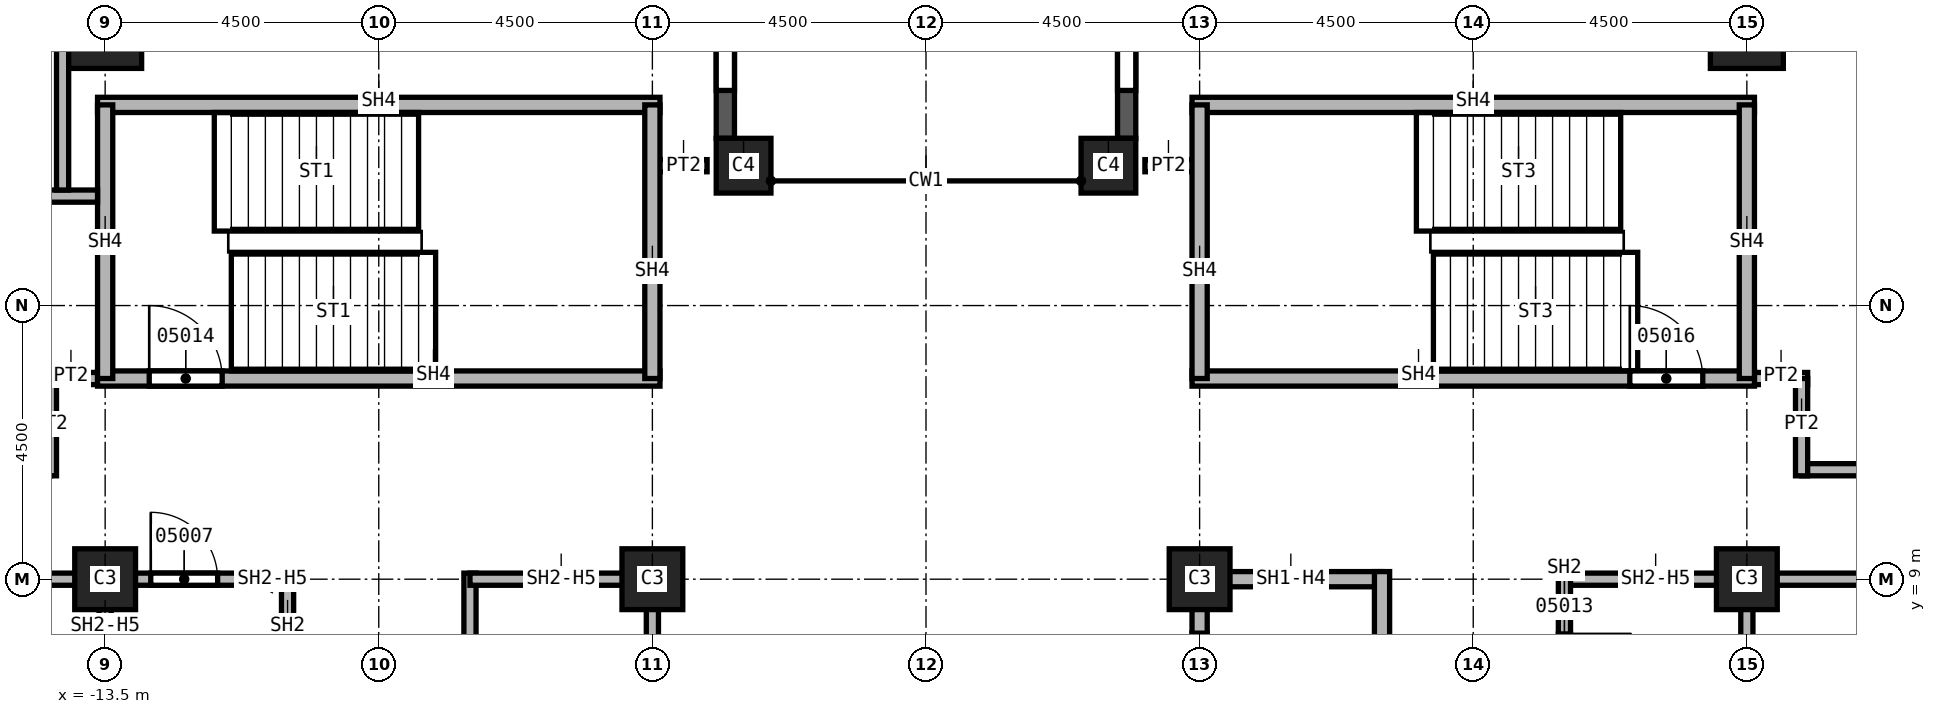
"""IFC4 building model, lengths in metres.
Left out: names, types, materials, properties, quantities, classifications, styles, units other than length and angle.
Written with IfcOpenShell. Run it as: python <this file> out.ifc"""

import sys

from ifc_helpers import new_model, si_unit, direction, frame, frame_2d, origin, origin_2d, place, context, subcontext, project, spatial, rectangle, extrude, element, fill, save


model = new_model("IFC4")
c1 = context("Model", 3, precision=1e-05, world=origin(), true_north=direction((0.0, 1.0)))
c2 = subcontext(c1, "Body", "Model", "MODEL_VIEW")
j1 = project(units=[si_unit("LENGTHUNIT", "METRE"), si_unit("PLANEANGLEUNIT", "RADIAN")], contexts=[c1])
p1 = place(None, origin())
s1 = spatial("IfcSite", under=j1, at=p1, CompositionType="ELEMENT")
p2 = place(p1, origin())
s2 = spatial("IfcBuilding", under=s1, at=p2, CompositionType="ELEMENT")
p3 = place(p2, frame((0.0, 0.0, 116.0)))
s3 = spatial("IfcBuildingStorey", under=s2, at=p3, CompositionType="ELEMENT", Elevation=116.0)
for number, where, z_axis, x_axis in (
    (1, (13.5, 18.0, 0.0), (0.0, 0.0, 1.0), (1.0, 0.0, 0.0)),
    (2, (-13.5, 18.0, 0.0), (0.0, 0.0, 1.0), (1.0, 0.0, 0.0)),
):
    element("IfcColumn", number, at=place(p3, frame(where, z_axis=z_axis, x_axis=x_axis)), inside=s3, PredefinedType="COLUMN", context=c2, shape_type="SweptSolid", body=[
        extrude(rectangle(XDim=1.2, YDim=1.2, at=origin_2d()), origin(), (0.0, 0.0, 1.0), 3.6),
    ])
for number, where, z_axis, x_axis in (
    (3, (4.5, 9.0, 0.0), (0.0, 0.0, 1.0), (1.0, 0.0, 0.0)),
    (4, (13.5, 9.0, 0.0), (0.0, 0.0, 1.0), (1.0, 0.0, 0.0)),
    (5, (-4.5, 9.0, 0.0), (0.0, 0.0, 1.0), (1.0, 0.0, 0.0)),
    (6, (-13.5, 9.0, 0.0), (0.0, 0.0, 1.0), (1.0, 0.0, 0.0)),
):
    element("IfcColumn", number, at=place(p3, frame(where, z_axis=z_axis, x_axis=x_axis)), inside=s3, PredefinedType="COLUMN", context=c2, shape_type="SweptSolid", body=[
        extrude(rectangle(XDim=1.0, YDim=1.0, at=origin_2d()), origin(), (0.0, 0.0, 1.0), 3.6),
    ])
for number, where, z_axis, x_axis in (
    (7, (3.0, 15.8, 0.0), (0.0, 0.0, 1.0), (1.0, 0.0, 0.0)),
    (8, (-3.0, 15.8, 0.0), (0.0, 0.0, 1.0), (1.0, 0.0, 0.0)),
):
    element("IfcColumn", number, at=place(p3, frame(where, z_axis=z_axis, x_axis=x_axis)), inside=s3, PredefinedType="COLUMN", context=c2, shape_type="SweptSolid", body=[
        extrude(rectangle(XDim=0.9, YDim=0.9, at=origin_2d()), origin(), (0.0, 0.0, 1.0), 3.6),
    ])
p4 = place(p3, frame((3.3, 24.2, 0.0), z_axis=(0.0, 0.0, 1.0), x_axis=(0.0, -1.0, 0.0)))
e9 = element("IfcWall", 9, at=p4, inside=s3, PredefinedType="SOLIDWALL", context=c2, shape_type="SweptSolid", body=[
    extrude(rectangle(XDim=7.95, YDim=0.3, at=frame_2d((3.975, 0.0))), origin(), (0.0, 0.0, 1.0), 3.0),
])
p5 = place(p4, frame((0.788, 0.0, 0.8)))
e10 = element("IfcOpeningElement", 10, at=p5, cuts=e9, PredefinedType="OPENING", context=c2, shape_type="SweptSolid", body=[
    extrude(rectangle(XDim=2.4, YDim=1.95, at=frame_2d((1.2, 0.975))), frame((0.0, 0.15, 0.0), z_axis=(0.0, -1.0, 0.0), x_axis=(1.0, 0.0, 0.0)), (0.0, 0.0, 1.0), 0.3),
])
p6 = place(p4, frame((4.762, 0.0, 0.8)))
e11 = element("IfcOpeningElement", 11, at=p6, cuts=e9, PredefinedType="OPENING", context=c2, shape_type="SweptSolid", body=[
    extrude(rectangle(XDim=2.4, YDim=1.95, at=frame_2d((1.2, 0.975))), frame((0.0, 0.15, 0.0), z_axis=(0.0, -1.0, 0.0), x_axis=(1.0, 0.0, 0.0)), (0.0, 0.0, 1.0), 0.3),
])
p7 = place(p3, frame((-3.3, 16.25, 0.0), z_axis=(0.0, 0.0, 1.0), x_axis=(0.0, 1.0, 0.0)))
e12 = element("IfcWall", 12, at=p7, inside=s3, PredefinedType="SOLIDWALL", context=c2, shape_type="SweptSolid", body=[
    extrude(rectangle(XDim=7.95, YDim=0.3, at=frame_2d((3.975, 0.0))), origin(), (0.0, 0.0, 1.0), 3.0),
])
p8 = place(p7, frame((0.788, 0.0, 0.8)))
e13 = element("IfcOpeningElement", 13, at=p8, cuts=e12, PredefinedType="OPENING", context=c2, shape_type="SweptSolid", body=[
    extrude(rectangle(XDim=2.4, YDim=1.95, at=frame_2d((1.2, 0.975))), frame((0.0, 0.15, 0.0), z_axis=(0.0, -1.0, 0.0), x_axis=(1.0, 0.0, 0.0)), (0.0, 0.0, 1.0), 0.3),
])
p9 = place(p7, frame((4.762, 0.0, 0.8)))
e14 = element("IfcOpeningElement", 14, at=p9, cuts=e12, PredefinedType="OPENING", context=c2, shape_type="SweptSolid", body=[
    extrude(rectangle(XDim=2.4, YDim=1.95, at=frame_2d((1.2, 0.975))), frame((0.0, 0.15, 0.0), z_axis=(0.0, -1.0, 0.0), x_axis=(1.0, 0.0, 0.0)), (0.0, 0.0, 1.0), 0.3),
])
p10 = place(p3, frame((-14.5, 12.3, 0.0), z_axis=(0.0, 0.0, 1.0), x_axis=(1.0, 0.0, 0.0)))
e15 = element("IfcWall", 15, at=p10, inside=s3, PredefinedType="PARTITIONING", context=c2, shape_type="SweptSolid", body=[
    extrude(rectangle(XDim=1.125, YDim=0.2, at=frame_2d((0.562, 0.0))), origin(), (0.0, 0.0, 1.0), 3.6),
])
p11 = place(p3, frame((-13.5, 9.0, 0.0), z_axis=(0.0, 0.0, 1.0), x_axis=(-1.0, 0.0, 0.0)))
e16 = element("IfcWall", 16, at=p11, inside=s3, PredefinedType="PARTITIONING", context=c2, shape_type="SweptSolid", body=[
    extrude(rectangle(XDim=4.5, YDim=0.2, at=frame_2d((2.25, 0.0))), origin(), (0.0, 0.0, 1.0), 3.6),
])
p12 = place(p3, frame((-14.4, 10.7, 0.0), z_axis=(0.0, 0.0, 1.0), x_axis=(0.0, 1.0, 0.0)))
e17 = element("IfcWall", 17, at=p12, inside=s3, PredefinedType="PARTITIONING", context=c2, shape_type="SweptSolid", body=[
    extrude(rectangle(XDim=1.6, YDim=0.2, at=frame_2d((0.8, 0.0))), origin(), (0.0, 0.0, 1.0), 3.6),
])
for number, where, z_axis, x_axis in (
    (18, (-4.5, 15.8, 0.0), (0.0, 0.0, 1.0), (1.0, 0.0, 0.0)),
    (19, (3.6, 15.8, 0.0), (0.0, 0.0, 1.0), (1.0, 0.0, 0.0)),
):
    element("IfcWall", number, at=place(p3, frame(where, z_axis=z_axis, x_axis=x_axis)), inside=s3, PredefinedType="PARTITIONING", context=c2, shape_type="SweptSolid", body=[
        extrude(rectangle(XDim=0.9, YDim=0.2, at=frame_2d((0.45, 0.0))), origin(), (0.0, 0.0, 1.0), 3.6),
    ])
p13 = place(p3, frame((13.375, 12.3, 0.0), z_axis=(0.0, 0.0, 1.0), x_axis=(1.0, 0.0, 0.0)))
e20 = element("IfcWall", 20, at=p13, inside=s3, PredefinedType="PARTITIONING", context=c2, shape_type="SweptSolid", body=[
    extrude(rectangle(XDim=1.125, YDim=0.2, at=frame_2d((0.562, 0.0))), origin(), (0.0, 0.0, 1.0), 3.6),
])
p14 = place(p3, frame((18.0, 9.0, 0.0), z_axis=(0.0, 0.0, 1.0), x_axis=(-1.0, 0.0, 0.0)))
e21 = element("IfcWall", 21, at=p14, inside=s3, PredefinedType="PARTITIONING", context=c2, shape_type="SweptSolid", body=[
    extrude(rectangle(XDim=4.5, YDim=0.2, at=frame_2d((2.25, 0.0))), origin(), (0.0, 0.0, 1.0), 3.6),
])
p15 = place(p3, frame((14.4, 10.8, 0.0), z_axis=(0.0, 0.0, 1.0), x_axis=(1.0, 0.0, 0.0)))
e22 = element("IfcWall", 22, at=p15, inside=s3, PredefinedType="PARTITIONING", context=c2, shape_type="SweptSolid", body=[
    extrude(rectangle(XDim=3.6, YDim=0.2, at=frame_2d((1.8, 0.0))), origin(), (0.0, 0.0, 1.0), 3.6),
])
p16 = place(p3, frame((14.4, 12.3, 0.0), z_axis=(0.0, 0.0, 1.0), x_axis=(0.0, -1.0, 0.0)))
e23 = element("IfcWall", 23, at=p16, inside=s3, PredefinedType="PARTITIONING", context=c2, shape_type="SweptSolid", body=[
    extrude(rectangle(XDim=1.6, YDim=0.2, at=frame_2d((0.8, 0.0))), origin(), (0.0, 0.0, 1.0), 3.6),
])
p17 = place(p3, frame((-13.6, 9.0, 0.0), z_axis=(0.0, 0.0, 1.0), x_axis=(1.0, 0.0, 0.0)))
e24 = element("IfcWall", 24, at=p17, inside=s3, PredefinedType="SOLIDWALL", context=c2, shape_type="SweptSolid", body=[
    extrude(rectangle(XDim=3.1, YDim=0.2, at=frame_2d((1.55, 0.0))), origin(), (0.0, 0.0, 1.0), 2.838),
])
p18 = place(p17, frame((0.85, 0.0, 0.0)))
e25 = element("IfcOpeningElement", 25, at=p18, cuts=e24, PredefinedType="OPENING", context=c2, shape_type="SweptSolid", body=[
    extrude(rectangle(XDim=1.1, YDim=2.1, at=frame_2d((0.55, 1.05))), frame((0.0, 0.1, 0.0), z_axis=(0.0, -1.0, 0.0), x_axis=(1.0, 0.0, 0.0)), (0.0, 0.0, 1.0), 0.2),
])
p19 = place(p3, frame((-13.5, 7.5, 0.0), z_axis=(0.0, 0.0, 1.0), x_axis=(0.0, 1.0, 0.0)))
e26 = element("IfcWall", 26, at=p19, inside=s3, PredefinedType="SOLIDWALL", context=c2, shape_type="SweptSolid", body=[
    extrude(rectangle(XDim=1.6, YDim=0.2, at=frame_2d((0.8, 0.0))), origin(), (0.0, 0.0, 1.0), 2.838),
])
p20 = place(p3, frame((-10.5, 7.425, 0.0), z_axis=(0.0, 0.0, 1.0), x_axis=(0.0, 1.0, 0.0)))
e27 = element("IfcWall", 27, at=p20, inside=s3, PredefinedType="SOLIDWALL", context=c2, shape_type="SweptSolid", body=[
    extrude(rectangle(XDim=1.675, YDim=0.2, at=frame_2d((0.837, 0.0))), origin(), (0.0, 0.0, 1.0), 3.6),
])
p21 = place(p3, frame((-7.5, 2.875, 0.0), z_axis=(0.0, 0.0, 1.0), x_axis=(0.0, 1.0, 0.0)))
e28 = element("IfcWall", 28, at=p21, inside=s3, PredefinedType="SOLIDWALL", context=c2, shape_type="SweptSolid", body=[
    extrude(rectangle(XDim=6.225, YDim=0.2, at=frame_2d((3.113, 0.0))), origin(), (0.0, 0.0, 1.0), 3.6),
])
p22 = place(p3, frame((-7.5, 9.0, 0.0), z_axis=(0.0, 0.0, 1.0), x_axis=(1.0, 0.0, 0.0)))
e29 = element("IfcWall", 29, at=p22, inside=s3, PredefinedType="SOLIDWALL", context=c2, shape_type="SweptSolid", body=[
    extrude(rectangle(XDim=3.0, YDim=0.2, at=frame_2d((1.5, 0.0))), origin(), (0.0, 0.0, 1.0), 2.838),
])
p23 = place(p3, frame((-4.5, 9.1, 0.0), z_axis=(0.0, 0.0, 1.0), x_axis=(0.0, -1.0, 0.0)))
e30 = element("IfcWall", 30, at=p23, inside=s3, PredefinedType="SOLIDWALL", context=c2, shape_type="SweptSolid", body=[
    extrude(rectangle(XDim=9.1, YDim=0.2, at=frame_2d((4.55, 0.0))), origin(), (0.0, 0.0, 1.0), 2.838),
])
p24 = place(p23, frame((4.9, 0.0, 0.0)))
e31 = element("IfcOpeningElement", 31, at=p24, cuts=e30, PredefinedType="OPENING", context=c2, shape_type="SweptSolid", body=[
    extrude(rectangle(XDim=1.1, YDim=2.1, at=frame_2d((0.55, 1.05))), frame((0.0, 0.1, 0.0), z_axis=(0.0, -1.0, 0.0), x_axis=(1.0, 0.0, 0.0)), (0.0, 0.0, 1.0), 0.2),
])
p25 = place(p3, frame((10.5, 9.0, 0.0), z_axis=(0.0, 0.0, 1.0), x_axis=(1.0, 0.0, 0.0)))
e32 = element("IfcWall", 32, at=p25, inside=s3, PredefinedType="SOLIDWALL", context=c2, shape_type="SweptSolid", body=[
    extrude(rectangle(XDim=3.1, YDim=0.2, at=frame_2d((1.55, 0.0))), origin(), (0.0, 0.0, 1.0), 2.838),
])
p26 = place(p3, frame((10.5, 9.1, 0.0), z_axis=(0.0, 0.0, 1.0), x_axis=(0.0, -1.0, 0.0)))
e33 = element("IfcWall", 33, at=p26, inside=s3, PredefinedType="SOLIDWALL", context=c2, shape_type="SweptSolid", body=[
    extrude(rectangle(XDim=3.225, YDim=0.2, at=frame_2d((1.613, 0.0))), origin(), (0.0, 0.0, 1.0), 3.6),
])
p27 = place(p26, frame((1.0, 0.0, 0.0)))
e34 = element("IfcOpeningElement", 34, at=p27, cuts=e33, PredefinedType="OPENING", context=c2, shape_type="SweptSolid", body=[
    extrude(rectangle(XDim=1.1, YDim=2.1, at=frame_2d((0.55, 1.05))), frame((0.0, 0.1, 0.0), z_axis=(0.0, -1.0, 0.0), x_axis=(1.0, 0.0, 0.0)), (0.0, 0.0, 1.0), 0.2),
])
p28 = place(p3, frame((13.5, 9.1, 0.0), z_axis=(0.0, 0.0, 1.0), x_axis=(0.0, -1.0, 0.0)))
e35 = element("IfcWall", 35, at=p28, inside=s3, PredefinedType="SOLIDWALL", context=c2, shape_type="SweptSolid", body=[
    extrude(rectangle(XDim=3.1, YDim=0.2, at=frame_2d((1.55, 0.0))), origin(), (0.0, 0.0, 1.0), 2.838),
])
p29 = place(p3, frame((4.5, 0.0, 0.0), z_axis=(0.0, 0.0, 1.0), x_axis=(0.0, 1.0, 0.0)))
e36 = element("IfcWall", 36, at=p29, inside=s3, PredefinedType="SOLIDWALL", context=c2, shape_type="SweptSolid", body=[
    extrude(rectangle(XDim=9.125, YDim=0.25, at=frame_2d((4.562, 0.0))), origin(), (0.0, 0.0, 1.0), 2.838),
])
p30 = place(p29, frame((0.95, 0.0, 0.0)))
e37 = element("IfcOpeningElement", 37, at=p30, cuts=e36, PredefinedType="OPENING", context=c2, shape_type="SweptSolid", body=[
    extrude(rectangle(XDim=1.1, YDim=2.1, at=frame_2d((0.55, 1.05))), frame((0.0, 0.125, 0.0), z_axis=(0.0, -1.0, 0.0), x_axis=(1.0, 0.0, 0.0)), (0.0, 0.0, 1.0), 0.25),
])
p31 = place(p29, frame((3.95, 0.0, 0.0)))
e38 = element("IfcOpeningElement", 38, at=p31, cuts=e36, PredefinedType="OPENING", context=c2, shape_type="SweptSolid", body=[
    extrude(rectangle(XDim=1.1, YDim=2.1, at=frame_2d((0.55, 1.05))), frame((0.0, 0.125, 0.0), z_axis=(0.0, -1.0, 0.0), x_axis=(1.0, 0.0, 0.0)), (0.0, 0.0, 1.0), 0.25),
])
p32 = place(p29, frame((7.012, 0.0, 0.0)))
e39 = element("IfcOpeningElement", 39, at=p32, cuts=e36, PredefinedType="OPENING", context=c2, shape_type="SweptSolid", body=[
    extrude(rectangle(XDim=1.1, YDim=2.1, at=frame_2d((0.55, 1.05))), frame((0.0, 0.125, 0.0), z_axis=(0.0, -1.0, 0.0), x_axis=(1.0, 0.0, 0.0)), (0.0, 0.0, 1.0), 0.25),
])
p33 = place(p3, frame((4.5, 9.0, 0.0), z_axis=(0.0, 0.0, 1.0), x_axis=(1.0, 0.0, 0.0)))
e40 = element("IfcWall", 40, at=p33, inside=s3, PredefinedType="SOLIDWALL", context=c2, shape_type="SweptSolid", body=[
    extrude(rectangle(XDim=3.0, YDim=0.25, at=frame_2d((1.5, 0.0))), origin(), (0.0, 0.0, 1.0), 2.838),
])
p34 = place(p3, frame((7.5, 9.125, 0.0), z_axis=(0.0, 0.0, 1.0), x_axis=(0.0, -1.0, 0.0)))
e41 = element("IfcWall", 41, at=p34, inside=s3, PredefinedType="SOLIDWALL", context=c2, shape_type="SweptSolid", body=[
    extrude(rectangle(XDim=12.25, YDim=0.25, at=frame_2d((6.125, 0.0))), origin(), (0.0, 0.0, 1.0), 3.6),
])
p35 = place(p3, frame((-13.625, 12.3, 0.0), z_axis=(0.0, 0.0, 1.0), x_axis=(1.0, 0.0, 0.0)))
e42 = element("IfcWall", 42, at=p35, inside=s3, PredefinedType="SOLIDWALL", context=c2, shape_type="SweptSolid", body=[
    extrude(rectangle(XDim=9.25, YDim=0.25, at=frame_2d((4.625, 0.0))), origin(), (0.0, 0.0, 1.0), 3.6),
])
p36 = place(p35, frame((0.85, 0.0, 0.0)))
e43 = element("IfcOpeningElement", 43, at=p36, cuts=e42, PredefinedType="OPENING", context=c2, shape_type="SweptSolid", body=[
    extrude(rectangle(XDim=1.2, YDim=2.1, at=frame_2d((0.6, 1.05))), frame((0.0, 0.125, 0.0), z_axis=(0.0, -1.0, 0.0), x_axis=(1.0, 0.0, 0.0)), (0.0, 0.0, 1.0), 0.25),
])
p37 = place(p3, frame((-13.625, 16.8, 0.0), z_axis=(0.0, 0.0, 1.0), x_axis=(1.0, 0.0, 0.0)))
e44 = element("IfcWall", 44, at=p37, inside=s3, PredefinedType="SOLIDWALL", context=c2, shape_type="SweptSolid", body=[
    extrude(rectangle(XDim=9.25, YDim=0.25, at=frame_2d((4.625, 0.0))), origin(), (0.0, 0.0, 1.0), 3.6),
])
for number, where, z_axis, x_axis in (
    (45, (-13.5, 12.3, 0.0), (0.0, 0.0, 1.0), (0.0, 1.0, 0.0)),
    (46, (-4.5, 16.8, 0.0), (0.0, 0.0, 1.0), (0.0, -1.0, 0.0)),
):
    element("IfcWall", number, at=place(p3, frame(where, z_axis=z_axis, x_axis=x_axis)), inside=s3, PredefinedType="SOLIDWALL", context=c2, shape_type="SweptSolid", body=[
        extrude(rectangle(XDim=4.5, YDim=0.25, at=frame_2d((2.25, 0.0))), origin(), (0.0, 0.0, 1.0), 3.6),
    ])
p38 = place(p3, frame((4.375, 12.3, 0.0), z_axis=(0.0, 0.0, 1.0), x_axis=(1.0, 0.0, 0.0)))
e47 = element("IfcWall", 47, at=p38, inside=s3, PredefinedType="SOLIDWALL", context=c2, shape_type="SweptSolid", body=[
    extrude(rectangle(XDim=9.25, YDim=0.25, at=frame_2d((4.625, 0.0))), origin(), (0.0, 0.0, 1.0), 3.6),
])
p39 = place(p38, frame((7.2, 0.0, 0.0)))
e48 = element("IfcOpeningElement", 48, at=p39, cuts=e47, PredefinedType="OPENING", context=c2, shape_type="SweptSolid", body=[
    extrude(rectangle(XDim=1.2, YDim=2.1, at=frame_2d((0.6, 1.05))), frame((0.0, 0.125, 0.0), z_axis=(0.0, -1.0, 0.0), x_axis=(1.0, 0.0, 0.0)), (0.0, 0.0, 1.0), 0.25),
])
p40 = place(p3, frame((4.375, 16.8, 0.0), z_axis=(0.0, 0.0, 1.0), x_axis=(1.0, 0.0, 0.0)))
e49 = element("IfcWall", 49, at=p40, inside=s3, PredefinedType="SOLIDWALL", context=c2, shape_type="SweptSolid", body=[
    extrude(rectangle(XDim=9.25, YDim=0.25, at=frame_2d((4.625, 0.0))), origin(), (0.0, 0.0, 1.0), 3.6),
])
for number, where, z_axis, x_axis in (
    (50, (4.5, 12.3, 0.0), (0.0, 0.0, 1.0), (0.0, 1.0, 0.0)),
    (51, (13.5, 16.8, 0.0), (0.0, 0.0, 1.0), (0.0, -1.0, 0.0)),
):
    element("IfcWall", number, at=place(p3, frame(where, z_axis=z_axis, x_axis=x_axis)), inside=s3, PredefinedType="SOLIDWALL", context=c2, shape_type="SweptSolid", body=[
        extrude(rectangle(XDim=4.5, YDim=0.25, at=frame_2d((2.25, 0.0))), origin(), (0.0, 0.0, 1.0), 3.6),
    ])
p41 = place(p3, frame((-21.9, 15.3, 0.0), z_axis=(0.0, 0.0, 1.0), x_axis=(1.0, 0.0, 0.0)))
e52 = element("IfcWall", 52, at=p41, inside=s3, PredefinedType="SOLIDWALL", context=c2, shape_type="SweptSolid", body=[
    extrude(rectangle(XDim=8.275, YDim=0.2, at=frame_2d((4.137, 0.0))), origin(), (0.0, 0.0, 1.0), 3.6),
])
p42 = place(p41, frame((4.8, 0.0, 0.0)))
e53 = element("IfcOpeningElement", 53, at=p42, cuts=e52, PredefinedType="OPENING", context=c2, shape_type="SweptSolid", body=[
    extrude(rectangle(XDim=1.2, YDim=2.1, at=frame_2d((0.6, 1.05))), frame((0.0, 0.1, 0.0), z_axis=(0.0, -1.0, 0.0), x_axis=(1.0, 0.0, 0.0)), (0.0, 0.0, 1.0), 0.2),
])
p43 = place(p3, frame((-14.2, 15.4, 0.0), z_axis=(0.0, 0.0, 1.0), x_axis=(0.0, 1.0, 0.0)))
e54 = element("IfcWall", 54, at=p43, inside=s3, PredefinedType="SOLIDWALL", context=c2, shape_type="SweptSolid", body=[
    extrude(rectangle(XDim=5.9, YDim=0.2, at=frame_2d((2.95, 0.0))), origin(), (0.0, 0.0, 1.0), 3.6),
])
p44 = place(p6, origin())
e55 = element("IfcWindow", 55, at=p44, inside=s3, PartitioningType="SINGLE_PANEL", PredefinedType="WINDOW", context=c2, shape_type="SweptSolid", body=[
    extrude(rectangle(XDim=2.4, YDim=1.95, at=frame_2d((1.2, 0.975))), frame((0.0, 0.03, 0.0), z_axis=(0.0, -1.0, 0.0), x_axis=(1.0, 0.0, 0.0)), (0.0, 0.0, 1.0), 0.06),
])
fill(e11, e55)
p45 = place(p8, origin())
e56 = element("IfcWindow", 56, at=p45, inside=s3, PartitioningType="SINGLE_PANEL", PredefinedType="WINDOW", context=c2, shape_type="SweptSolid", body=[
    extrude(rectangle(XDim=2.4, YDim=1.95, at=frame_2d((1.2, 0.975))), frame((0.0, 0.03, 0.0), z_axis=(0.0, -1.0, 0.0), x_axis=(1.0, 0.0, 0.0)), (0.0, 0.0, 1.0), 0.06),
])
fill(e13, e56)
p46 = place(p18, origin())
e57 = element("IfcDoor", 57, at=p46, inside=s3, OperationType="SINGLE_SWING_RIGHT", PredefinedType="DOOR", context=c2, shape_type="SweptSolid", body=[
    extrude(rectangle(XDim=1.1, YDim=2.1, at=frame_2d((0.55, 1.05))), frame((0.0, 0.025, 0.0), z_axis=(0.0, -1.0, 0.0), x_axis=(1.0, 0.0, 0.0)), (0.0, 0.0, 1.0), 0.05),
])
fill(e25, e57)
p47 = place(p36, origin())
e58 = element("IfcDoor", 58, at=p47, inside=s3, OperationType="SINGLE_SWING_LEFT", PredefinedType="DOOR", context=c2, shape_type="SweptSolid", body=[
    extrude(rectangle(XDim=1.2, YDim=2.1, at=frame_2d((0.6, 1.05))), frame((0.0, 0.025, 0.0), z_axis=(0.0, -1.0, 0.0), x_axis=(1.0, 0.0, 0.0)), (0.0, 0.0, 1.0), 0.05),
])
fill(e43, e58)
p48 = place(p39, origin())
e59 = element("IfcDoor", 59, at=p48, inside=s3, OperationType="SINGLE_SWING_LEFT", PredefinedType="DOOR", context=c2, shape_type="SweptSolid", body=[
    extrude(rectangle(XDim=1.2, YDim=2.1, at=frame_2d((0.6, 1.05))), frame((0.0, 0.025, 0.0), z_axis=(0.0, -1.0, 0.0), x_axis=(1.0, 0.0, 0.0)), (0.0, 0.0, 1.0), 0.05),
])
fill(e48, e59)
p49 = place(p32, origin())
e60 = element("IfcDoor", 60, at=p49, inside=s3, OperationType="SLIDING_TO_LEFT", PredefinedType="DOOR", context=c2, shape_type="SweptSolid", body=[
    extrude(rectangle(XDim=1.1, YDim=2.1, at=frame_2d((0.55, 1.05))), frame((0.0, 0.025, 0.0), z_axis=(0.0, -1.0, 0.0), x_axis=(1.0, 0.0, 0.0)), (0.0, 0.0, 1.0), 0.05),
])
fill(e39, e60)
save(model, sys.argv[1])
